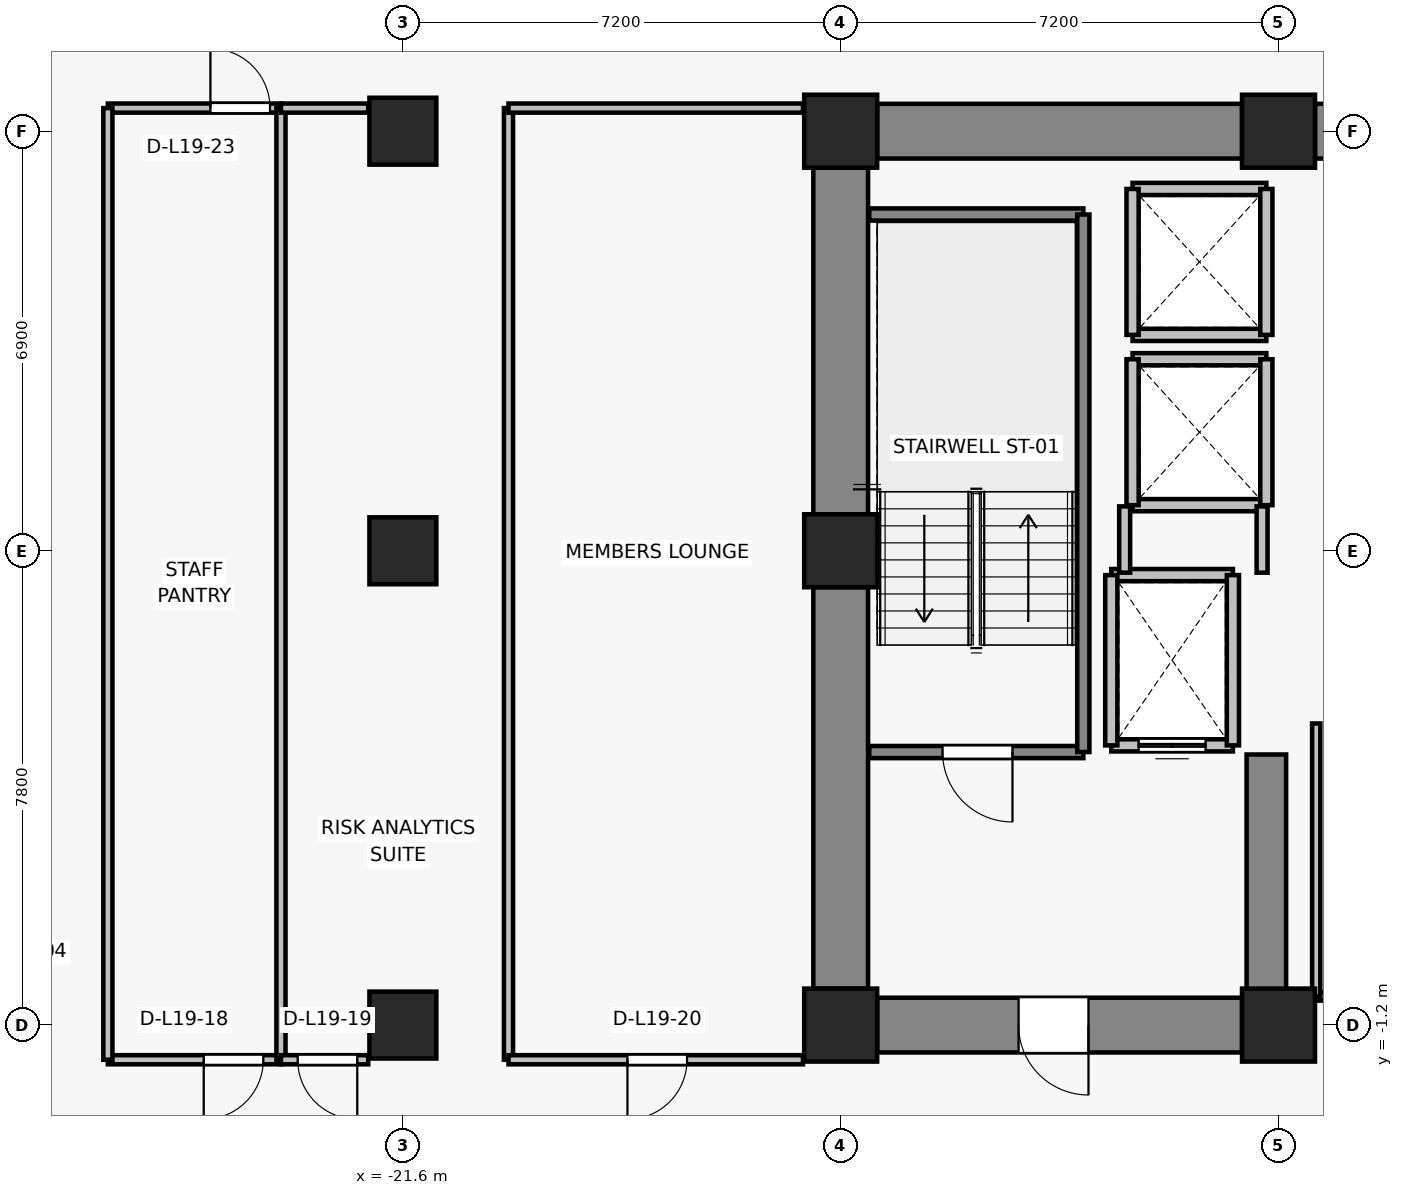
"""IFC4 building model, lengths in metres.
Left out: names, types, materials, properties, quantities, classifications, styles, units other than length and angle.
Written with IfcOpenShell. Run it as: python <this file> out.ifc"""

import sys

from ifc_helpers import new_model, si_unit, direction, frame, frame_2d, origin, origin_2d, place, context, subcontext, project, spatial, rectangle, extrude, source, transform, mapped, element, fill, save


model = new_model("IFC4")
c1 = context("Model", 3, precision=1e-05, world=origin(), true_north=direction((0.0, 1.0)))
c2 = subcontext(c1, "Body", "Model", "MODEL_VIEW")
j1 = project(units=[si_unit("LENGTHUNIT", "METRE"), si_unit("PLANEANGLEUNIT", "RADIAN")], contexts=[c1])
p1 = place(None, origin())
s1 = spatial("IfcSite", under=j1, at=p1, CompositionType="ELEMENT")
p2 = place(p1, origin())
s2 = spatial("IfcBuilding", under=s1, at=p2, CompositionType="ELEMENT")
p3 = place(p2, frame((0.0, 0.0, 70.3)))
s3 = spatial("IfcBuildingStorey", under=s2, at=p3, CompositionType="ELEMENT", Elevation=70.3)
for number, where, z_axis, x_axis in (
    (1, (-14.4, -1.2, 0.0), (0.0, 0.0, 1.0), (1.0, 0.0, 0.0)),
    (2, (-7.2, -1.2, 0.0), (0.0, 0.0, 1.0), (1.0, 0.0, 0.0)),
    (3, (-14.4, 6.6, 0.0), (0.0, 0.0, 1.0), (1.0, 0.0, 0.0)),
    (4, (-14.4, 13.5, 0.0), (0.0, 0.0, 1.0), (1.0, 0.0, 0.0)),
    (5, (-7.2, 13.5, 0.0), (0.0, 0.0, 1.0), (1.0, 0.0, 0.0)),
):
    element("IfcColumn", number, at=place(p3, frame(where, z_axis=z_axis, x_axis=x_axis)), inside=s3, PredefinedType="COLUMN", context=c2, shape_type="SweptSolid", body=[
        extrude(rectangle(XDim=1.2, YDim=1.2, at=origin_2d()), origin(), (0.0, 0.0, 1.0), 3.3),
    ])
for number, where, z_axis, x_axis in (
    (6, (-21.6, -1.2, 0.0), (0.0, 0.0, 1.0), (1.0, 0.0, 0.0)),
    (7, (-21.6, 6.6, 0.0), (0.0, 0.0, 1.0), (1.0, 0.0, 0.0)),
    (8, (-21.6, 13.5, 0.0), (0.0, 0.0, 1.0), (1.0, 0.0, 0.0)),
):
    element("IfcColumn", number, at=place(p3, frame(where, z_axis=z_axis, x_axis=x_axis)), inside=s3, PredefinedType="COLUMN", context=c2, shape_type="SweptSolid", body=[
        extrude(rectangle(XDim=1.1, YDim=1.1, at=origin_2d()), origin(), (0.0, 0.0, 1.0), 3.3),
    ])
p4 = place(p3, frame((-13.8, 13.5, 0.0), z_axis=(0.0, 0.0, 1.0), x_axis=(1.0, 0.0, 0.0)))
e9 = element("IfcWall", 9, at=p4, inside=s3, PredefinedType="SHEAR", context=c2, shape_type="SweptSolid", body=[
    extrude(rectangle(XDim=6.0, YDim=0.9, at=frame_2d((3.0, 0.0))), origin(), (0.0, 0.0, 1.0), 3.075),
])
p5 = place(p3, frame((-6.6, 13.5, 0.0), z_axis=(0.0, 0.0, 1.0), x_axis=(1.0, 0.0, 0.0)))
e10 = element("IfcWall", 10, at=p5, inside=s3, PredefinedType="SHEAR", context=c2, shape_type="SweptSolid", body=[
    extrude(rectangle(XDim=13.2, YDim=0.9, at=frame_2d((6.6, 0.0))), origin(), (0.0, 0.0, 1.0), 3.075),
])
p6 = place(p3, frame((-14.4, -0.6, 0.0), z_axis=(0.0, 0.0, 1.0), x_axis=(0.0, 1.0, 0.0)))
e11 = element("IfcWall", 11, at=p6, inside=s3, PredefinedType="SHEAR", context=c2, shape_type="SweptSolid", body=[
    extrude(rectangle(XDim=6.6, YDim=0.9, at=frame_2d((3.3, 0.0))), origin(), (0.0, 0.0, 1.0), 3.075),
])
p7 = place(p3, frame((-14.4, 7.2, 0.0), z_axis=(0.0, 0.0, 1.0), x_axis=(0.0, 1.0, 0.0)))
e12 = element("IfcWall", 12, at=p7, inside=s3, PredefinedType="SHEAR", context=c2, shape_type="SweptSolid", body=[
    extrude(rectangle(XDim=5.7, YDim=0.9, at=frame_2d((2.85, 0.0))), origin(), (0.0, 0.0, 1.0), 3.075),
])
p8 = place(p3, frame((-7.8, -1.2, 0.0), z_axis=(0.0, 0.0, 1.0), x_axis=(-1.0, 0.0, 0.0)))
e13 = element("IfcWall", 13, at=p8, inside=s3, PredefinedType="SHEAR", context=c2, shape_type="SweptSolid", body=[
    extrude(rectangle(XDim=6.0, YDim=0.9, at=frame_2d((3.0, 0.0))), origin(), (0.0, 0.0, 1.0), 3.075),
])
p9 = place(p8, frame((2.525, 0.0, 0.0)))
e14 = element("IfcOpeningElement", 14, at=p9, cuts=e13, PredefinedType="OPENING", context=c2, shape_type="SweptSolid", body=[
    extrude(rectangle(XDim=1.15, YDim=2.15, at=frame_2d((0.575, 1.075))), frame((0.0, 0.46, 0.0), z_axis=(0.0, -1.0, 0.0), x_axis=(1.0, 0.0, 0.0)), (0.0, 0.0, 1.0), 0.92),
])
p10 = place(p3, frame((-7.4, -0.75, 0.0), z_axis=(0.0, 0.0, 1.0), x_axis=(0.0, 1.0, 0.0)))
e15 = element("IfcWall", 15, at=p10, inside=s3, PredefinedType="SHEAR", context=c2, shape_type="SweptSolid", body=[
    extrude(rectangle(XDim=4.0, YDim=0.65, at=frame_2d((2.0, 0.0))), origin(), (0.0, 0.0, 1.0), 3.075),
])
p11 = place(p3, frame((-7.95, 3.4, 0.0), z_axis=(0.0, 0.0, 1.0), x_axis=(-1.0, 0.0, 0.0)))
e16 = element("IfcWall", 16, at=p11, inside=s3, PredefinedType="SOLIDWALL", context=c2, shape_type="SweptSolid", body=[
    extrude(rectangle(XDim=2.0, YDim=0.2, at=frame_2d((1.0, 0.0))), origin(), (0.0, 0.0, 1.0), 3.075),
])
p12 = place(p11, frame((0.45, 0.0, 0.0)))
e17 = element("IfcOpeningElement", 17, at=p12, cuts=e16, PredefinedType="OPENING", context=c2, shape_type="SweptSolid", body=[
    extrude(rectangle(XDim=1.1, YDim=2.2, at=frame_2d((0.55, 1.1))), frame((0.0, 0.11, 0.0), z_axis=(0.0, -1.0, 0.0), x_axis=(1.0, 0.0, 0.0)), (0.0, 0.0, 1.0), 0.22),
])
p13 = place(p3, frame((-9.95, 6.2, 0.0), z_axis=(0.0, 0.0, 1.0), x_axis=(1.0, 0.0, 0.0)))
e18 = element("IfcWall", 18, at=p13, inside=s3, PredefinedType="SOLIDWALL", context=c2, shape_type="SweptSolid", body=[
    extrude(rectangle(XDim=2.0, YDim=0.2, at=frame_2d((1.0, 0.0))), origin(), (0.0, 0.0, 1.0), 3.075),
])
for number, where, z_axis, x_axis in (
    (19, (-9.95, 3.4, 0.0), (0.0, 0.0, 1.0), (0.0, 1.0, 0.0)),
    (20, (-7.95, 6.2, 0.0), (0.0, 0.0, 1.0), (0.0, -1.0, 0.0)),
):
    element("IfcWall", number, at=place(p3, frame(where, z_axis=z_axis, x_axis=x_axis)), inside=s3, PredefinedType="SOLIDWALL", context=c2, shape_type="SweptSolid", body=[
        extrude(rectangle(XDim=2.8, YDim=0.2, at=frame_2d((1.4, 0.0))), origin(), (0.0, 0.0, 1.0), 3.075),
    ])
for number, where, z_axis, x_axis in (
    (21, (-7.4, 7.35, 0.0), (0.0, 0.0, 1.0), (-1.0, 0.0, 0.0)),
    (22, (-9.6, 9.75, 0.0), (0.0, 0.0, 1.0), (1.0, 0.0, 0.0)),
):
    element("IfcWall", number, at=place(p3, frame(where, z_axis=z_axis, x_axis=x_axis)), inside=s3, PredefinedType="SOLIDWALL", context=c2, shape_type="SweptSolid", body=[
        extrude(rectangle(XDim=2.2, YDim=0.2, at=frame_2d((1.1, 0.0))), origin(), (0.0, 0.0, 1.0), 2.465),
    ])
p14 = place(p3, frame((-9.6, 7.35, 0.0), z_axis=(0.0, 0.0, 1.0), x_axis=(0.0, 1.0, 0.0)))
e23 = element("IfcWall", 23, at=p14, inside=s3, PredefinedType="SOLIDWALL", context=c2, shape_type="SweptSolid", body=[
    extrude(rectangle(XDim=2.4, YDim=0.2, at=frame_2d((1.2, 0.0))), origin(), (0.0, 0.0, 1.0), 3.075),
])
p15 = place(p3, frame((-7.4, 9.75, 0.0), z_axis=(0.0, 0.0, 1.0), x_axis=(0.0, -1.0, 0.0)))
e24 = element("IfcWall", 24, at=p15, inside=s3, PredefinedType="SOLIDWALL", context=c2, shape_type="SweptSolid", body=[
    extrude(rectangle(XDim=2.4, YDim=0.2, at=frame_2d((1.2, 0.0))), origin(), (0.0, 0.0, 1.0), 2.465),
])
for number, where, z_axis, x_axis in (
    (25, (-7.4, 10.15, 0.0), (0.0, 0.0, 1.0), (-1.0, 0.0, 0.0)),
    (26, (-9.6, 12.55, 0.0), (0.0, 0.0, 1.0), (1.0, 0.0, 0.0)),
):
    element("IfcWall", number, at=place(p3, frame(where, z_axis=z_axis, x_axis=x_axis)), inside=s3, PredefinedType="SOLIDWALL", context=c2, shape_type="SweptSolid", body=[
        extrude(rectangle(XDim=2.2, YDim=0.2, at=frame_2d((1.1, 0.0))), origin(), (0.0, 0.0, 1.0), 2.465),
    ])
p16 = place(p3, frame((-9.6, 10.15, 0.0), z_axis=(0.0, 0.0, 1.0), x_axis=(0.0, 1.0, 0.0)))
e27 = element("IfcWall", 27, at=p16, inside=s3, PredefinedType="SOLIDWALL", context=c2, shape_type="SweptSolid", body=[
    extrude(rectangle(XDim=2.4, YDim=0.2, at=frame_2d((1.2, 0.0))), origin(), (0.0, 0.0, 1.0), 3.075),
])
p17 = place(p3, frame((-7.4, 12.55, 0.0), z_axis=(0.0, 0.0, 1.0), x_axis=(0.0, -1.0, 0.0)))
e28 = element("IfcWall", 28, at=p17, inside=s3, PredefinedType="SOLIDWALL", context=c2, shape_type="SweptSolid", body=[
    extrude(rectangle(XDim=2.4, YDim=0.2, at=frame_2d((1.2, 0.0))), origin(), (0.0, 0.0, 1.0), 2.465),
])
p18 = place(p3, frame((-10.41, 3.29, 0.0), z_axis=(0.0, 0.0, 1.0), x_axis=(-1.0, 0.0, 0.0)))
e29 = element("IfcWall", 29, at=p18, inside=s3, PredefinedType="SOLIDWALL", context=c2, shape_type="SweptSolid", body=[
    extrude(rectangle(XDim=3.52, YDim=0.2, at=frame_2d((1.76, 0.0))), origin(), (0.0, 0.0, 1.0), 3.075),
])
p19 = place(p18, frame((1.165, 0.0, 0.0)))
e30 = element("IfcOpeningElement", 30, at=p19, cuts=e29, PredefinedType="OPENING", context=c2, shape_type="SweptSolid", body=[
    extrude(rectangle(XDim=1.15, YDim=2.15, at=frame_2d((0.575, 1.075))), frame((0.0, 0.11, 0.0), z_axis=(0.0, -1.0, 0.0), x_axis=(1.0, 0.0, 0.0)), (0.0, 0.0, 1.0), 0.22),
])
p20 = place(p3, frame((-13.93, 12.13, 0.0), z_axis=(0.0, 0.0, 1.0), x_axis=(1.0, 0.0, 0.0)))
e31 = element("IfcWall", 31, at=p20, inside=s3, PredefinedType="SOLIDWALL", context=c2, shape_type="SweptSolid", body=[
    extrude(rectangle(XDim=3.52, YDim=0.2, at=frame_2d((1.76, 0.0))), origin(), (0.0, 0.0, 1.0), 3.075),
])
p21 = place(p3, frame((-10.41, 12.13, 0.0), z_axis=(0.0, 0.0, 1.0), x_axis=(0.0, -1.0, 0.0)))
e32 = element("IfcWall", 32, at=p21, inside=s3, PredefinedType="SOLIDWALL", context=c2, shape_type="SweptSolid", body=[
    extrude(rectangle(XDim=8.84, YDim=0.2, at=frame_2d((4.42, 0.0))), origin(), (0.0, 0.0, 1.0), 3.075),
])
p22 = place(p3, frame((-9.73, 6.24, 0.0), z_axis=(0.0, 0.0, 1.0), x_axis=(0.0, 1.0, 0.0)))
e33 = element("IfcWall", 33, at=p22, inside=s3, PredefinedType="PARTITIONING", context=c2, shape_type="SweptSolid", body=[
    extrude(rectangle(XDim=1.09, YDim=0.18, at=frame_2d((0.545, 0.0))), origin(), (0.0, 0.0, 1.0), 3.075),
])
p23 = place(p3, frame((-7.47, 7.33, 0.0), z_axis=(0.0, 0.0, 1.0), x_axis=(0.0, -1.0, 0.0)))
e34 = element("IfcWall", 34, at=p23, inside=s3, PredefinedType="PARTITIONING", context=c2, shape_type="SweptSolid", body=[
    extrude(rectangle(XDim=1.09, YDim=0.18, at=frame_2d((0.545, 0.0))), origin(), (0.0, 0.0, 1.0), 2.465),
])
p24 = place(p3, frame((-3.47, -0.73, 0.0), z_axis=(0.0, 0.0, 1.0), x_axis=(-1.0, 0.0, 0.0)))
e35 = element("IfcWall", 35, at=p24, inside=s3, PredefinedType="PARTITIONING", context=c2, shape_type="SweptSolid", body=[
    extrude(rectangle(XDim=3.11, YDim=0.135, at=frame_2d((1.555, 0.0))), origin(), (0.0, 0.0, 1.0), 3.075),
])
p25 = place(p24, frame((1.09, 0.0, 0.0)))
e36 = element("IfcOpeningElement", 36, at=p25, cuts=e35, PredefinedType="OPENING", context=c2, shape_type="SweptSolid", body=[
    extrude(rectangle(XDim=0.92, YDim=2.1, at=frame_2d((0.46, 1.05))), frame((0.0, 0.077, 0.0), z_axis=(0.0, -1.0, 0.0), x_axis=(1.0, 0.0, 0.0)), (0.0, 0.0, 1.0), 0.155),
])
p26 = place(p3, frame((-6.58, -0.73, 0.0), z_axis=(0.0, 0.0, 1.0), x_axis=(0.0, 1.0, 0.0)))
e37 = element("IfcWall", 37, at=p26, inside=s3, PredefinedType="PARTITIONING", context=c2, shape_type="SweptSolid", body=[
    extrude(rectangle(XDim=4.49, YDim=0.135, at=frame_2d((2.245, 0.0))), origin(), (0.0, 0.0, 1.0), 3.075),
])
p27 = place(p3, frame((-23.605, -1.77, 0.0), z_axis=(0.0, 0.0, 1.0), x_axis=(-1.0, 0.0, 0.0)))
e38 = element("IfcWall", 38, at=p27, inside=s3, PredefinedType="PARTITIONING", context=c2, shape_type="SweptSolid", body=[
    extrude(rectangle(XDim=2.846, YDim=0.15, at=frame_2d((1.423, 0.0))), origin(), (0.0, 0.0, 1.0), 3.075),
])
p28 = place(p27, frame((0.29, 0.0, 0.0)))
e39 = element("IfcOpeningElement", 39, at=p28, cuts=e38, PredefinedType="OPENING", context=c2, shape_type="SweptSolid", body=[
    extrude(rectangle(XDim=0.98, YDim=2.15, at=frame_2d((0.49, 1.075))), frame((0.0, 0.085, 0.0), z_axis=(0.0, -1.0, 0.0), x_axis=(1.0, 0.0, 0.0)), (0.0, 0.0, 1.0), 0.17),
])
p29 = place(p3, frame((-26.451, 13.88, 0.0), z_axis=(0.0, 0.0, 1.0), x_axis=(1.0, 0.0, 0.0)))
e40 = element("IfcWall", 40, at=p29, inside=s3, PredefinedType="PARTITIONING", context=c2, shape_type="SweptSolid", body=[
    extrude(rectangle(XDim=2.846, YDim=0.15, at=frame_2d((1.423, 0.0))), origin(), (0.0, 0.0, 1.0), 3.075),
])
p30 = place(p29, frame((1.686, 0.0, 0.0)))
e41 = element("IfcOpeningElement", 41, at=p30, cuts=e40, PredefinedType="OPENING", context=c2, shape_type="SweptSolid", body=[
    extrude(rectangle(XDim=0.98, YDim=2.15, at=frame_2d((0.49, 1.075))), frame((0.0, 0.085, 0.0), z_axis=(0.0, -1.0, 0.0), x_axis=(1.0, 0.0, 0.0)), (0.0, 0.0, 1.0), 0.17),
])
for number, where, z_axis, x_axis in (
    (42, (-26.451, -1.77, 0.0), (0.0, 0.0, 1.0), (0.0, 1.0, 0.0)),
    (43, (-23.605, 13.88, 0.0), (0.0, 0.0, 1.0), (0.0, -1.0, 0.0)),
):
    element("IfcWall", number, at=place(p3, frame(where, z_axis=z_axis, x_axis=x_axis)), inside=s3, PredefinedType="PARTITIONING", context=c2, shape_type="SweptSolid", body=[
        extrude(rectangle(XDim=15.65, YDim=0.15, at=frame_2d((7.825, 0.0))), origin(), (0.0, 0.0, 1.0), 2.465),
    ])
p31 = place(p3, frame((-22.17, -1.77, 0.0), z_axis=(0.0, 0.0, 1.0), x_axis=(-1.0, 0.0, 0.0)))
e44 = element("IfcWall", 44, at=p31, inside=s3, PredefinedType="PARTITIONING", context=c2, shape_type="SweptSolid", body=[
    extrude(rectangle(XDim=1.435, YDim=0.15, at=frame_2d((0.718, 0.0))), origin(), (0.0, 0.0, 1.0), 3.075),
])
p32 = place(p31, frame((0.18, 0.0, 0.0)))
e45 = element("IfcOpeningElement", 45, at=p32, cuts=e44, PredefinedType="OPENING", context=c2, shape_type="SweptSolid", body=[
    extrude(rectangle(XDim=0.98, YDim=2.15, at=frame_2d((0.49, 1.075))), frame((0.0, 0.085, 0.0), z_axis=(0.0, -1.0, 0.0), x_axis=(1.0, 0.0, 0.0)), (0.0, 0.0, 1.0), 0.17),
])
p33 = place(p3, frame((-23.605, 13.88, 0.0), z_axis=(0.0, 0.0, 1.0), x_axis=(1.0, 0.0, 0.0)))
e46 = element("IfcWall", 46, at=p33, inside=s3, PredefinedType="PARTITIONING", context=c2, shape_type="SweptSolid", body=[
    extrude(rectangle(XDim=1.435, YDim=0.15, at=frame_2d((0.718, 0.0))), origin(), (0.0, 0.0, 1.0), 3.075),
])
p34 = place(p3, frame((-19.863, 13.88, 0.0), z_axis=(0.0, 0.0, 1.0), x_axis=(0.0, -1.0, 0.0)))
e47 = element("IfcWall", 47, at=p34, inside=s3, PredefinedType="PARTITIONING", context=c2, shape_type="SweptSolid", body=[
    extrude(rectangle(XDim=15.65, YDim=0.15, at=frame_2d((7.825, 0.0))), origin(), (0.0, 0.0, 1.0), 2.465),
])
p35 = place(p3, frame((-15.02, -1.77, 0.0), z_axis=(0.0, 0.0, 1.0), x_axis=(-1.0, 0.0, 0.0)))
e48 = element("IfcWall", 48, at=p35, inside=s3, PredefinedType="PARTITIONING", context=c2, shape_type="SweptSolid", body=[
    extrude(rectangle(XDim=4.843, YDim=0.15, at=frame_2d((2.421, 0.0))), origin(), (0.0, 0.0, 1.0), 3.075),
])
p36 = place(p35, frame((1.907, 0.0, 0.0)))
e49 = element("IfcOpeningElement", 49, at=p36, cuts=e48, PredefinedType="OPENING", context=c2, shape_type="SweptSolid", body=[
    extrude(rectangle(XDim=0.98, YDim=2.15, at=frame_2d((0.49, 1.075))), frame((0.0, 0.085, 0.0), z_axis=(0.0, -1.0, 0.0), x_axis=(1.0, 0.0, 0.0)), (0.0, 0.0, 1.0), 0.17),
])
p37 = place(p3, frame((-19.863, 13.88, 0.0), z_axis=(0.0, 0.0, 1.0), x_axis=(1.0, 0.0, 0.0)))
e50 = element("IfcWall", 50, at=p37, inside=s3, PredefinedType="PARTITIONING", context=c2, shape_type="SweptSolid", body=[
    extrude(rectangle(XDim=4.843, YDim=0.15, at=frame_2d((2.421, 0.0))), origin(), (0.0, 0.0, 1.0), 3.075),
])
m1 = source(origin(), c2, "Body", "SweptSolid", [
    extrude(rectangle(XDim=1.1, YDim=2.2, at=frame_2d((0.55, 1.1))), frame((0.0, 0.025, 0.0), z_axis=(0.0, -1.0, 0.0), x_axis=(1.0, 0.0, 0.0)), (0.0, 0.0, 1.0), 0.05),
])
p38 = place(p12, origin())
e51 = element("IfcDoor", 51, at=p38, inside=s3, OperationType="DOUBLE_DOOR_SLIDING", PredefinedType="DOOR", context=c2, shape_type="MappedRepresentation", body=[
    mapped(m1, transform((0.0, 0.0, 0.0), x_axis=(1.0, 0.0, 0.0), y_axis=(0.0, 1.0, 0.0), z_axis=(0.0, 0.0, 1.0), scale=1.0)),
])
fill(e17, e51)
m2 = source(origin(), c2, "Body", "SweptSolid", [
    extrude(rectangle(XDim=1.15, YDim=2.15, at=frame_2d((0.575, 1.075))), frame((0.0, 0.025, 0.0), z_axis=(0.0, -1.0, 0.0), x_axis=(1.0, 0.0, 0.0)), (0.0, 0.0, 1.0), 0.05),
])
p39 = place(p19, origin())
e52 = element("IfcDoor", 52, at=p39, inside=s3, OperationType="SINGLE_SWING_LEFT", PredefinedType="DOOR", context=c2, shape_type="MappedRepresentation", body=[
    mapped(m2, transform((0.0, 0.0, 0.0), x_axis=(1.0, 0.0, 0.0), y_axis=(0.0, 1.0, 0.0), z_axis=(0.0, 0.0, 1.0), scale=1.0)),
])
fill(e30, e52)
p40 = place(p9, origin())
e53 = element("IfcDoor", 53, at=p40, inside=s3, OperationType="SINGLE_SWING_LEFT", PredefinedType="DOOR", context=c2, shape_type="MappedRepresentation", body=[
    mapped(m2, transform((0.0, 0.0, 0.0), x_axis=(1.0, 0.0, 0.0), y_axis=(0.0, 1.0, 0.0), z_axis=(0.0, 0.0, 1.0), scale=1.0)),
])
fill(e14, e53)
m3 = source(origin(), c2, "Body", "SweptSolid", [
    extrude(rectangle(XDim=0.98, YDim=2.15, at=frame_2d((0.49, 1.075))), frame((0.0, 0.025, 0.0), z_axis=(0.0, -1.0, 0.0), x_axis=(1.0, 0.0, 0.0)), (0.0, 0.0, 1.0), 0.05),
])
p41 = place(p28, origin())
e54 = element("IfcDoor", 54, at=p41, inside=s3, OperationType="SINGLE_SWING_RIGHT", PredefinedType="DOOR", context=c2, shape_type="MappedRepresentation", body=[
    mapped(m3, transform((0.0, 0.0, 0.0), x_axis=(1.0, 0.0, 0.0), y_axis=(0.0, 1.0, 0.0), z_axis=(0.0, 0.0, 1.0), scale=1.0)),
])
fill(e39, e54)
p42 = place(p32, origin())
e55 = element("IfcDoor", 55, at=p42, inside=s3, OperationType="SINGLE_SWING_LEFT", PredefinedType="DOOR", context=c2, shape_type="MappedRepresentation", body=[
    mapped(m3, transform((0.0, 0.0, 0.0), x_axis=(1.0, 0.0, 0.0), y_axis=(0.0, 1.0, 0.0), z_axis=(0.0, 0.0, 1.0), scale=1.0)),
])
fill(e45, e55)
p43 = place(p36, origin())
e56 = element("IfcDoor", 56, at=p43, inside=s3, OperationType="SINGLE_SWING_RIGHT", PredefinedType="DOOR", context=c2, shape_type="MappedRepresentation", body=[
    mapped(m3, transform((0.0, 0.0, 0.0), x_axis=(1.0, 0.0, 0.0), y_axis=(0.0, 1.0, 0.0), z_axis=(0.0, 0.0, 1.0), scale=1.0)),
])
fill(e49, e56)
p44 = place(p30, origin())
e57 = element("IfcDoor", 57, at=p44, inside=s3, OperationType="SINGLE_SWING_LEFT", PredefinedType="DOOR", context=c2, shape_type="MappedRepresentation", body=[
    mapped(m3, transform((0.0, 0.0, 0.0), x_axis=(1.0, 0.0, 0.0), y_axis=(0.0, 1.0, 0.0), z_axis=(0.0, 0.0, 1.0), scale=1.0)),
])
fill(e41, e57)
save(model, sys.argv[1])
